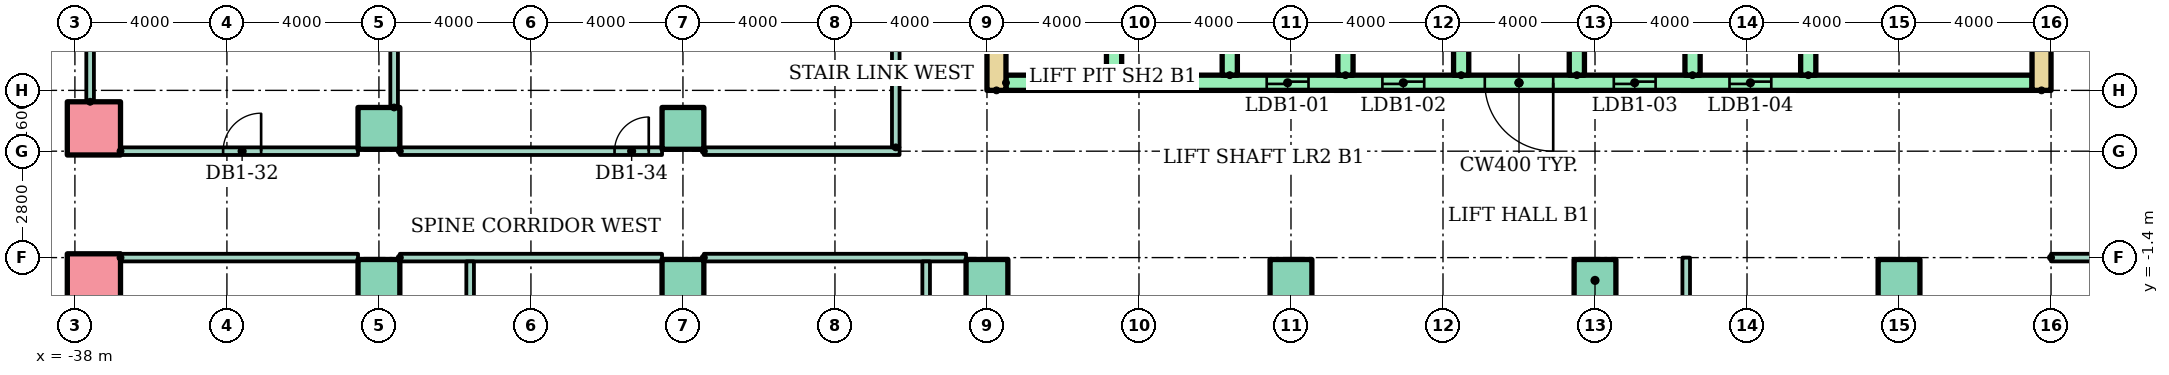
"""IFC4 building model, lengths in metres.
Left out: names, types, materials, properties, quantities, classifications, styles, units other than length and angle.
Written with IfcOpenShell. Run it as: python <this file> out.ifc"""

import sys

from ifc_helpers import new_model, si_unit, direction, frame, frame_2d, origin, origin_2d, place, context, subcontext, project, spatial, rectangle, hollow_rectangle, extrude, element, fill, save


model = new_model("IFC4")
c1 = context("Model", 3, precision=1e-05, world=origin(), true_north=direction((0.0, 1.0)))
c2 = subcontext(c1, "Body", "Model", "MODEL_VIEW")
j1 = project(units=[si_unit("LENGTHUNIT", "METRE"), si_unit("PLANEANGLEUNIT", "RADIAN")], contexts=[c1])
p1 = place(None, origin())
s1 = spatial("IfcSite", under=j1, at=p1, CompositionType="ELEMENT")
p2 = place(p1, origin())
s2 = spatial("IfcBuilding", under=s1, at=p2, CompositionType="ELEMENT")
p3 = place(p2, frame((0.0, 0.0, -5.0)))
s3 = spatial("IfcBuildingStorey", under=s2, at=p3, CompositionType="ELEMENT", Elevation=-5.0)
p4 = place(p3, frame((-37.5, -2.0, 0.0)))
e1 = element("IfcColumn", 1, at=p4, inside=s3, PredefinedType="COLUMN", context=c2, shape_type="SweptSolid", body=[
    extrude(hollow_rectangle(XDim=1.4, YDim=1.4, WallThickness=0.08, at=origin_2d()), origin(), (0.0, 0.0, 1.0), 5.0),
])
for number, where in (
    (2, (-30.0, -2.0, 0.0)),
    (3, (-22.0, -2.0, 0.0)),
    (4, (-14.0, -2.0, 0.0)),
    (5, (-6.0, -2.0, 0.0)),
    (6, (2.0, -2.0, 0.0)),
    (7, (10.0, -2.0, 0.0)),
):
    element("IfcColumn", number, at=place(p3, frame(where)), inside=s3, PredefinedType="COLUMN", context=c2, shape_type="SweptSolid", body=[
        extrude(rectangle(XDim=1.1, YDim=1.1, at=origin_2d()), origin(), (0.0, 0.0, 1.0), 5.0),
    ])
p5 = place(p3, frame((-37.5, 2.0, 0.0)))
e8 = element("IfcColumn", 8, at=p5, inside=s3, PredefinedType="COLUMN", context=c2, shape_type="SweptSolid", body=[
    extrude(hollow_rectangle(XDim=1.4, YDim=1.4, WallThickness=0.08, at=origin_2d()), origin(), (0.0, 0.0, 1.0), 5.0),
])
for number, where in (
    (9, (-30.0, 2.0, 0.0)),
    (10, (-22.0, 2.0, 0.0)),
):
    element("IfcColumn", number, at=place(p3, frame(where)), inside=s3, PredefinedType="COLUMN", context=c2, shape_type="SweptSolid", body=[
        extrude(rectangle(XDim=1.1, YDim=1.1, at=origin_2d()), origin(), (0.0, 0.0, 1.0), 5.0),
    ])
for number, where, z_axis, x_axis in (
    (11, (-13.75, 3.0, 0.0), (0.0, 0.0, 1.0), (0.0, 1.0, 0.0)),
    (12, (13.75, 3.0, 0.0), (0.0, 0.0, 1.0), (0.0, 1.0, 0.0)),
):
    element("IfcWall", number, at=place(p3, frame(where, z_axis=z_axis, x_axis=x_axis)), inside=s3, PredefinedType="SHEAR", context=c2, shape_type="SweptSolid", body=[
        extrude(rectangle(XDim=17.4, YDim=0.5, at=frame_2d((8.7, 0.0))), origin(), (0.0, 0.0, 1.0), 4.58),
    ])
p6 = place(p3, frame((-13.5, 3.2, 0.0)))
e13 = element("IfcWall", 13, at=p6, inside=s3, PredefinedType="SHEAR", context=c2, shape_type="SweptSolid", body=[
    extrude(rectangle(XDim=27.0, YDim=0.4, at=frame_2d((13.5, 0.0))), origin(), (0.0, 0.0, 1.0), 4.58),
])
p7 = place(p6, frame((6.861, 0.0, 0.0)))
e14 = element("IfcOpeningElement", 14, at=p7, cuts=e13, PredefinedType="OPENING", context=c2, shape_type="SweptSolid", body=[
    extrude(rectangle(XDim=1.1, YDim=2.1, at=frame_2d((0.55, 1.05))), frame((0.0, 0.21, 0.0), z_axis=(0.0, -1.0, 0.0), x_axis=(1.0, 0.0, 0.0)), (0.0, 0.0, 1.0), 0.42),
])
p8 = place(p6, frame((9.906, 0.0, 0.0)))
e15 = element("IfcOpeningElement", 15, at=p8, cuts=e13, PredefinedType="OPENING", context=c2, shape_type="SweptSolid", body=[
    extrude(rectangle(XDim=1.1, YDim=2.1, at=frame_2d((0.55, 1.05))), frame((0.0, 0.21, 0.0), z_axis=(0.0, -1.0, 0.0), x_axis=(1.0, 0.0, 0.0)), (0.0, 0.0, 1.0), 0.42),
])
p9 = place(p6, frame((15.994, 0.0, 0.0)))
e16 = element("IfcOpeningElement", 16, at=p9, cuts=e13, PredefinedType="OPENING", context=c2, shape_type="SweptSolid", body=[
    extrude(rectangle(XDim=1.1, YDim=2.1, at=frame_2d((0.55, 1.05))), frame((0.0, 0.21, 0.0), z_axis=(0.0, -1.0, 0.0), x_axis=(1.0, 0.0, 0.0)), (0.0, 0.0, 1.0), 0.42),
])
p10 = place(p6, frame((19.039, 0.0, 0.0)))
e17 = element("IfcOpeningElement", 17, at=p10, cuts=e13, PredefinedType="OPENING", context=c2, shape_type="SweptSolid", body=[
    extrude(rectangle(XDim=1.1, YDim=2.1, at=frame_2d((0.55, 1.05))), frame((0.0, 0.21, 0.0), z_axis=(0.0, -1.0, 0.0), x_axis=(1.0, 0.0, 0.0)), (0.0, 0.0, 1.0), 0.42),
])
p11 = place(p6, frame((12.6, 0.0, 0.0)))
e18 = element("IfcOpeningElement", 18, at=p11, cuts=e13, PredefinedType="OPENING", context=c2, shape_type="SweptSolid", body=[
    extrude(rectangle(XDim=1.8, YDim=2.1, at=frame_2d((0.9, 1.05))), frame((0.0, 0.21, 0.0), z_axis=(0.0, -1.0, 0.0), x_axis=(1.0, 0.0, 0.0)), (0.0, 0.0, 1.0), 0.42),
])
for number, where, z_axis, x_axis in (
    (19, (-10.656, 3.4, 0.0), (0.0, 0.0, 1.0), (0.0, 1.0, 0.0)),
    (20, (-7.611, 3.4, 0.0), (0.0, 0.0, 1.0), (0.0, 1.0, 0.0)),
    (21, (-4.567, 3.4, 0.0), (0.0, 0.0, 1.0), (0.0, 1.0, 0.0)),
    (22, (-1.522, 3.4, 0.0), (0.0, 0.0, 1.0), (0.0, 1.0, 0.0)),
    (23, (1.522, 3.4, 0.0), (0.0, 0.0, 1.0), (0.0, 1.0, 0.0)),
    (24, (4.567, 3.4, 0.0), (0.0, 0.0, 1.0), (0.0, 1.0, 0.0)),
    (25, (7.611, 3.4, 0.0), (0.0, 0.0, 1.0), (0.0, 1.0, 0.0)),
):
    element("IfcWall", number, at=place(p3, frame(where, z_axis=z_axis, x_axis=x_axis)), inside=s3, PredefinedType="SHEAR", context=c2, shape_type="SweptSolid", body=[
        extrude(rectangle(XDim=3.0, YDim=0.4, at=frame_2d((1.5, 0.0))), origin(), (0.0, 0.0, 1.0), 4.58),
    ])
p12 = place(p3, frame((-36.8, -1.4, 0.0)))
e26 = element("IfcWall", 26, at=p12, inside=s3, PredefinedType="PARTITIONING", context=c2, shape_type="SweptSolid", body=[
    extrude(rectangle(XDim=6.25, YDim=0.2, at=frame_2d((3.125, 0.0))), origin(), (0.0, 0.0, 1.0), 4.58),
])
for number, where in (
    (27, (-29.45, -1.4, 0.0)),
    (28, (-21.45, -1.4, 0.0)),
):
    element("IfcWall", number, at=place(p3, frame(where)), inside=s3, PredefinedType="PARTITIONING", context=c2, shape_type="SweptSolid", body=[
        extrude(rectangle(XDim=6.9, YDim=0.2, at=frame_2d((3.45, 0.0))), origin(), (0.0, 0.0, 1.0), 4.58),
    ])
p13 = place(p3, frame((14.0, -1.4, 0.0)))
e29 = element("IfcWall", 29, at=p13, inside=s3, PredefinedType="PARTITIONING", context=c2, shape_type="SweptSolid", body=[
    extrude(rectangle(XDim=3.45, YDim=0.2, at=frame_2d((1.725, 0.0))), origin(), (0.0, 0.0, 1.0), 4.58),
])
p14 = place(p3, frame((-36.8, 1.4, 0.0)))
e30 = element("IfcWall", 30, at=p14, inside=s3, PredefinedType="PARTITIONING", context=c2, shape_type="SweptSolid", body=[
    extrude(rectangle(XDim=6.25, YDim=0.2, at=frame_2d((3.125, 0.0))), origin(), (0.0, 0.0, 1.0), 4.58),
])
p15 = place(p14, frame((2.7, 0.0, 0.0)))
e31 = element("IfcOpeningElement", 31, at=p15, cuts=e30, PredefinedType="OPENING", context=c2, shape_type="SweptSolid", body=[
    extrude(rectangle(XDim=1.0, YDim=2.1, at=frame_2d((0.5, 1.05))), frame((0.0, 0.11, 0.0), z_axis=(0.0, -1.0, 0.0), x_axis=(1.0, 0.0, 0.0)), (0.0, 0.0, 1.0), 0.22),
])
p16 = place(p3, frame((-29.45, 1.4, 0.0)))
e32 = element("IfcWall", 32, at=p16, inside=s3, PredefinedType="PARTITIONING", context=c2, shape_type="SweptSolid", body=[
    extrude(rectangle(XDim=6.9, YDim=0.2, at=frame_2d((3.45, 0.0))), origin(), (0.0, 0.0, 1.0), 4.58),
])
p17 = place(p16, frame((5.65, 0.0, 0.0)))
e33 = element("IfcOpeningElement", 33, at=p17, cuts=e32, PredefinedType="OPENING", context=c2, shape_type="SweptSolid", body=[
    extrude(rectangle(XDim=0.9, YDim=2.1, at=frame_2d((0.45, 1.05))), frame((0.0, 0.11, 0.0), z_axis=(0.0, -1.0, 0.0), x_axis=(1.0, 0.0, 0.0)), (0.0, 0.0, 1.0), 0.22),
])
p18 = place(p3, frame((-21.45, 1.4, 0.0)))
e34 = element("IfcWall", 34, at=p18, inside=s3, PredefinedType="PARTITIONING", context=c2, shape_type="SweptSolid", body=[
    extrude(rectangle(XDim=5.15, YDim=0.2, at=frame_2d((2.575, 0.0))), origin(), (0.0, 0.0, 1.0), 4.58),
])
p19 = place(p3, frame((-37.6, 2.7, 0.0), z_axis=(0.0, 0.0, 1.0), x_axis=(0.0, 1.0, 0.0)))
e35 = element("IfcWall", 35, at=p19, inside=s3, PredefinedType="PARTITIONING", context=c2, shape_type="SweptSolid", body=[
    extrude(rectangle(XDim=5.8, YDim=0.2, at=frame_2d((2.9, 0.0))), origin(), (0.0, 0.0, 1.0), 4.58),
])
p20 = place(p3, frame((-29.6, 2.55, 0.0), z_axis=(0.0, 0.0, 1.0), x_axis=(0.0, 1.0, 0.0)))
e36 = element("IfcWall", 36, at=p20, inside=s3, PredefinedType="PARTITIONING", context=c2, shape_type="SweptSolid", body=[
    extrude(rectangle(XDim=5.95, YDim=0.2, at=frame_2d((2.975, 0.0))), origin(), (0.0, 0.0, 1.0), 4.58),
])
p21 = place(p3, frame((-27.6, -6.25, 0.0), z_axis=(0.0, 0.0, 1.0), x_axis=(0.0, 1.0, 0.0)))
e37 = element("IfcWall", 37, at=p21, inside=s3, PredefinedType="PARTITIONING", context=c2, shape_type="SweptSolid", body=[
    extrude(rectangle(XDim=4.75, YDim=0.2, at=frame_2d((2.375, 0.0))), origin(), (0.0, 0.0, 1.0), 4.58),
])
p22 = place(p3, frame((-16.4, 1.5, 0.0), z_axis=(0.0, 0.0, 1.0), x_axis=(0.0, 1.0, 0.0)))
e38 = element("IfcWall", 38, at=p22, inside=s3, PredefinedType="PARTITIONING", context=c2, shape_type="SweptSolid", body=[
    extrude(rectangle(XDim=7.0, YDim=0.2, at=frame_2d((3.5, 0.0))), origin(), (0.0, 0.0, 1.0), 4.58),
])
p23 = place(p3, frame((-15.6, -6.25, 0.0), z_axis=(0.0, 0.0, 1.0), x_axis=(0.0, 1.0, 0.0)))
e39 = element("IfcWall", 39, at=p23, inside=s3, PredefinedType="PARTITIONING", context=c2, shape_type="SweptSolid", body=[
    extrude(rectangle(XDim=4.75, YDim=0.2, at=frame_2d((2.375, 0.0))), origin(), (0.0, 0.0, 1.0), 4.58),
])
p24 = place(p3, frame((4.4, -6.25, 0.0), z_axis=(0.0, 0.0, 1.0), x_axis=(0.0, 1.0, 0.0)))
e40 = element("IfcWall", 40, at=p24, inside=s3, PredefinedType="PARTITIONING", context=c2, shape_type="SweptSolid", body=[
    extrude(rectangle(XDim=4.85, YDim=0.2, at=frame_2d((2.425, 0.0))), origin(), (0.0, 0.0, 1.0), 4.58),
])
p25 = place(p7, origin())
e41 = element("IfcDoor", 41, at=p25, inside=s3, OperationType="SLIDING_TO_LEFT", PredefinedType="DOOR", context=c2, shape_type="SweptSolid", body=[
    extrude(rectangle(XDim=1.1, YDim=2.1, at=frame_2d((0.55, 1.05))), frame((0.0, 0.025, 0.0), z_axis=(0.0, -1.0, 0.0), x_axis=(1.0, 0.0, 0.0)), (0.0, 0.0, 1.0), 0.05),
])
fill(e14, e41)
p26 = place(p8, origin())
e42 = element("IfcDoor", 42, at=p26, inside=s3, OperationType="SLIDING_TO_LEFT", PredefinedType="DOOR", context=c2, shape_type="SweptSolid", body=[
    extrude(rectangle(XDim=1.1, YDim=2.1, at=frame_2d((0.55, 1.05))), frame((0.0, 0.025, 0.0), z_axis=(0.0, -1.0, 0.0), x_axis=(1.0, 0.0, 0.0)), (0.0, 0.0, 1.0), 0.05),
])
fill(e15, e42)
p27 = place(p9, origin())
e43 = element("IfcDoor", 43, at=p27, inside=s3, OperationType="SLIDING_TO_LEFT", PredefinedType="DOOR", context=c2, shape_type="SweptSolid", body=[
    extrude(rectangle(XDim=1.1, YDim=2.1, at=frame_2d((0.55, 1.05))), frame((0.0, 0.025, 0.0), z_axis=(0.0, -1.0, 0.0), x_axis=(1.0, 0.0, 0.0)), (0.0, 0.0, 1.0), 0.05),
])
fill(e16, e43)
p28 = place(p10, origin())
e44 = element("IfcDoor", 44, at=p28, inside=s3, OperationType="SLIDING_TO_LEFT", PredefinedType="DOOR", context=c2, shape_type="SweptSolid", body=[
    extrude(rectangle(XDim=1.1, YDim=2.1, at=frame_2d((0.55, 1.05))), frame((0.0, 0.025, 0.0), z_axis=(0.0, -1.0, 0.0), x_axis=(1.0, 0.0, 0.0)), (0.0, 0.0, 1.0), 0.05),
])
fill(e17, e44)
p29 = place(p11, frame((1.8, 0.0, 0.0), z_axis=(0.0, 0.0, 1.0), x_axis=(-1.0, 0.0, 0.0)))
e45 = element("IfcDoor", 45, at=p29, inside=s3, OperationType="DOUBLE_DOOR_SINGLE_SWING", PredefinedType="DOOR", context=c2, shape_type="SweptSolid", body=[
    extrude(rectangle(XDim=1.8, YDim=2.1, at=frame_2d((0.9, 1.05))), frame((0.0, 0.025, 0.0), z_axis=(0.0, -1.0, 0.0), x_axis=(1.0, 0.0, 0.0)), (0.0, 0.0, 1.0), 0.05),
])
fill(e18, e45)
p30 = place(p15, origin())
e46 = element("IfcDoor", 46, at=p30, inside=s3, OperationType="SINGLE_SWING_RIGHT", PredefinedType="DOOR", context=c2, shape_type="SweptSolid", body=[
    extrude(rectangle(XDim=1.0, YDim=2.1, at=frame_2d((0.5, 1.05))), frame((0.0, 0.025, 0.0), z_axis=(0.0, -1.0, 0.0), x_axis=(1.0, 0.0, 0.0)), (0.0, 0.0, 1.0), 0.05),
])
fill(e31, e46)
p31 = place(p17, origin())
e47 = element("IfcDoor", 47, at=p31, inside=s3, OperationType="SINGLE_SWING_RIGHT", PredefinedType="DOOR", context=c2, shape_type="SweptSolid", body=[
    extrude(rectangle(XDim=0.9, YDim=2.1, at=frame_2d((0.45, 1.05))), frame((0.0, 0.025, 0.0), z_axis=(0.0, -1.0, 0.0), x_axis=(1.0, 0.0, 0.0)), (0.0, 0.0, 1.0), 0.05),
])
fill(e33, e47)
save(model, sys.argv[1])
